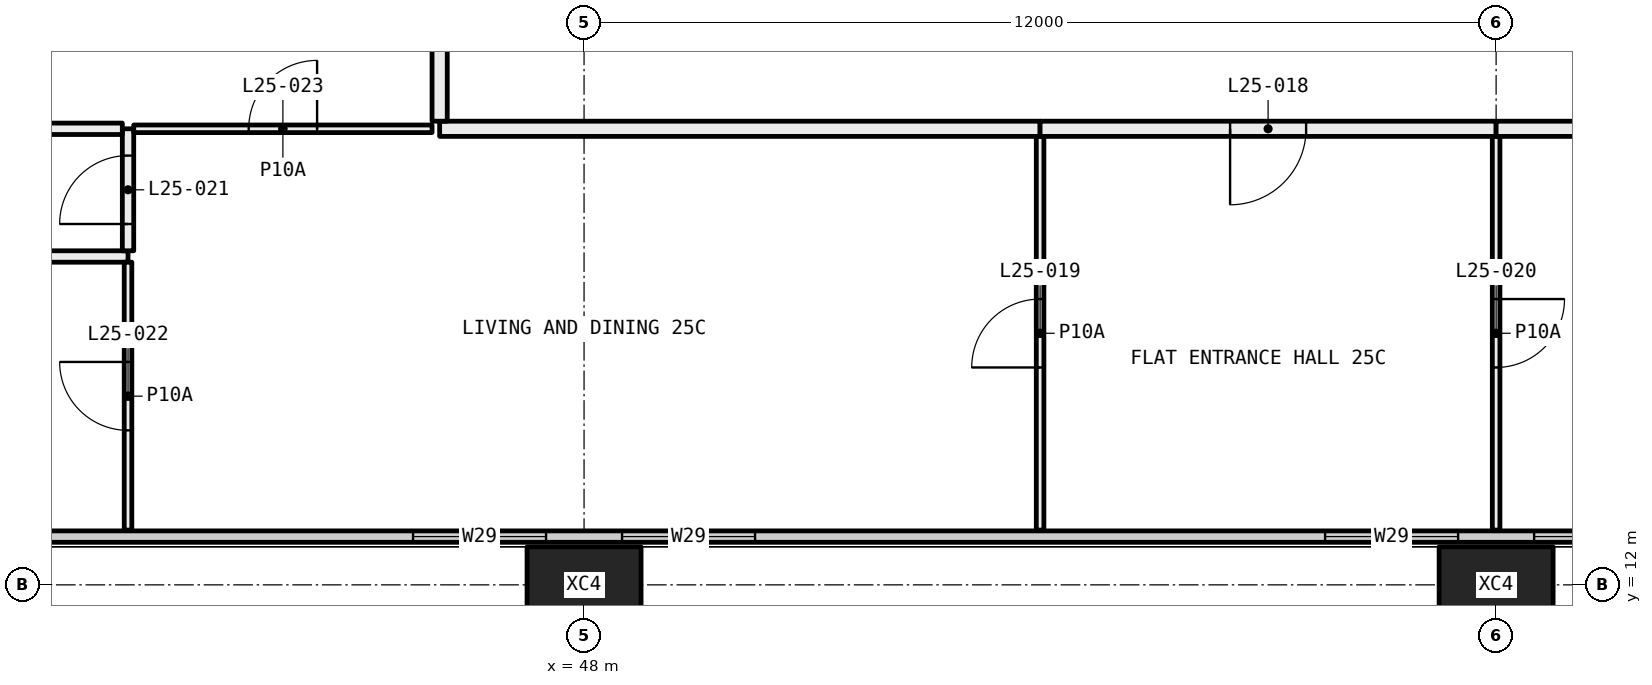
"""IFC4 building model, lengths in metres.
Left out: names, types, materials, properties, quantities, classifications, styles, units other than length and angle.
Written with IfcOpenShell. Run it as: python <this file> out.ifc"""

import sys

from ifc_helpers import new_model, si_unit, direction, frame, frame_2d, origin, origin_2d, place, context, subcontext, project, spatial, rectangle, hollow_rectangle, extrude, element, fill, save


model = new_model("IFC4")
c1 = context("Model", 3, precision=1e-05, world=origin(), true_north=direction((0.0, 1.0)))
c2 = subcontext(c1, "Body", "Model", "MODEL_VIEW")
j1 = project(units=[si_unit("LENGTHUNIT", "METRE"), si_unit("PLANEANGLEUNIT", "RADIAN")], contexts=[c1])
p1 = place(None, origin())
s1 = spatial("IfcSite", under=j1, at=p1, CompositionType="ELEMENT")
p2 = place(p1, origin())
s2 = spatial("IfcBuilding", under=s1, at=p2, CompositionType="ELEMENT")
p3 = place(p2, frame((0.0, 0.0, 100.05)))
s3 = spatial("IfcBuildingStorey", under=s2, at=p3, CompositionType="ELEMENT", Elevation=100.05)
for number, where, z_axis, x_axis in (
    (1, (48.0, 12.0, -0.4), (0.0, 0.0, 1.0), (1.0, 0.0, 0.0)),
    (2, (60.0, 12.0, -0.4), (0.0, 0.0, 1.0), (1.0, 0.0, 0.0)),
):
    element("IfcColumn", number, at=place(p3, frame(where, z_axis=z_axis, x_axis=x_axis)), inside=s3, PredefinedType="COLUMN", context=c2, shape_type="SweptSolid", body=[
        extrude(hollow_rectangle(XDim=1.5, YDim=1.0, WallThickness=0.06, at=origin_2d()), origin(), (0.0, 0.0, 1.0), 3.45),
    ])
p4 = place(p3, frame((6.56, 12.635, 0.0), z_axis=(0.0, 0.0, 1.0), x_axis=(1.0, 0.0, 0.0)))
e3 = element("IfcWall", 3, at=p4, inside=s3, PredefinedType="ELEMENTEDWALL", context=c2, shape_type="SweptSolid", body=[
    extrude(rectangle(XDim=58.88, YDim=0.15, at=frame_2d((29.44, 0.0))), origin(), (0.0, 0.0, 1.0), 3.05),
])
p5 = place(p4, frame((0.44, 0.0, 0.45)))
e4 = element("IfcOpeningElement", 4, at=p5, cuts=e3, PredefinedType="OPENING", context=c2, shape_type="SweptSolid", body=[
    extrude(rectangle(XDim=4.5, YDim=2.55, at=frame_2d((2.25, 1.275))), frame((0.0, 0.085, 0.0), z_axis=(0.0, -1.0, 0.0), x_axis=(1.0, 0.0, 0.0)), (0.0, 0.0, 1.0), 0.17),
])
p6 = place(p4, frame((5.94, 0.0, 0.45)))
e5 = element("IfcOpeningElement", 5, at=p6, cuts=e3, PredefinedType="OPENING", context=c2, shape_type="SweptSolid", body=[
    extrude(rectangle(XDim=1.75, YDim=2.55, at=frame_2d((0.875, 1.275))), frame((0.0, 0.085, 0.0), z_axis=(0.0, -1.0, 0.0), x_axis=(1.0, 0.0, 0.0)), (0.0, 0.0, 1.0), 0.17),
])
p7 = place(p4, frame((15.19, 0.0, 0.45)))
e6 = element("IfcOpeningElement", 6, at=p7, cuts=e3, PredefinedType="OPENING", context=c2, shape_type="SweptSolid", body=[
    extrude(rectangle(XDim=1.75, YDim=2.55, at=frame_2d((0.875, 1.275))), frame((0.0, 0.085, 0.0), z_axis=(0.0, -1.0, 0.0), x_axis=(1.0, 0.0, 0.0)), (0.0, 0.0, 1.0), 0.17),
])
p8 = place(p4, frame((17.94, 0.0, 0.45)))
e7 = element("IfcOpeningElement", 7, at=p8, cuts=e3, PredefinedType="OPENING", context=c2, shape_type="SweptSolid", body=[
    extrude(rectangle(XDim=1.75, YDim=2.55, at=frame_2d((0.875, 1.275))), frame((0.0, 0.085, 0.0), z_axis=(0.0, -1.0, 0.0), x_axis=(1.0, 0.0, 0.0)), (0.0, 0.0, 1.0), 0.17),
])
p9 = place(p4, frame((27.19, 0.0, 0.45)))
e8 = element("IfcOpeningElement", 8, at=p9, cuts=e3, PredefinedType="OPENING", context=c2, shape_type="SweptSolid", body=[
    extrude(rectangle(XDim=1.75, YDim=2.55, at=frame_2d((0.875, 1.275))), frame((0.0, 0.085, 0.0), z_axis=(0.0, -1.0, 0.0), x_axis=(1.0, 0.0, 0.0)), (0.0, 0.0, 1.0), 0.17),
])
p10 = place(p4, frame((29.94, 0.0, 0.45)))
e9 = element("IfcOpeningElement", 9, at=p10, cuts=e3, PredefinedType="OPENING", context=c2, shape_type="SweptSolid", body=[
    extrude(rectangle(XDim=1.75, YDim=2.55, at=frame_2d((0.875, 1.275))), frame((0.0, 0.085, 0.0), z_axis=(0.0, -1.0, 0.0), x_axis=(1.0, 0.0, 0.0)), (0.0, 0.0, 1.0), 0.17),
])
p11 = place(p4, frame((39.19, 0.0, 0.45)))
e10 = element("IfcOpeningElement", 10, at=p11, cuts=e3, PredefinedType="OPENING", context=c2, shape_type="SweptSolid", body=[
    extrude(rectangle(XDim=1.75, YDim=2.55, at=frame_2d((0.875, 1.275))), frame((0.0, 0.085, 0.0), z_axis=(0.0, -1.0, 0.0), x_axis=(1.0, 0.0, 0.0)), (0.0, 0.0, 1.0), 0.17),
])
p12 = place(p4, frame((41.94, 0.0, 0.45)))
e11 = element("IfcOpeningElement", 11, at=p12, cuts=e3, PredefinedType="OPENING", context=c2, shape_type="SweptSolid", body=[
    extrude(rectangle(XDim=1.75, YDim=2.55, at=frame_2d((0.875, 1.275))), frame((0.0, 0.085, 0.0), z_axis=(0.0, -1.0, 0.0), x_axis=(1.0, 0.0, 0.0)), (0.0, 0.0, 1.0), 0.17),
])
p13 = place(p4, frame((51.19, 0.0, 0.45)))
e12 = element("IfcOpeningElement", 12, at=p13, cuts=e3, PredefinedType="OPENING", context=c2, shape_type="SweptSolid", body=[
    extrude(rectangle(XDim=1.75, YDim=2.55, at=frame_2d((0.875, 1.275))), frame((0.0, 0.085, 0.0), z_axis=(0.0, -1.0, 0.0), x_axis=(1.0, 0.0, 0.0)), (0.0, 0.0, 1.0), 0.17),
])
p14 = place(p4, frame((53.94, 0.0, 0.45)))
e13 = element("IfcOpeningElement", 13, at=p14, cuts=e3, PredefinedType="OPENING", context=c2, shape_type="SweptSolid", body=[
    extrude(rectangle(XDim=4.5, YDim=2.55, at=frame_2d((2.25, 1.275))), frame((0.0, 0.085, 0.0), z_axis=(0.0, -1.0, 0.0), x_axis=(1.0, 0.0, 0.0)), (0.0, 0.0, 1.0), 0.17),
])
p15 = place(p3, frame((42.0, 16.32, 0.0), z_axis=(0.0, 0.0, 1.0), x_axis=(-1.0, 0.0, 0.0)))
e14 = element("IfcWall", 14, at=p15, inside=s3, PredefinedType="PARTITIONING", context=c2, shape_type="SweptSolid", body=[
    extrude(rectangle(XDim=5.9, YDim=0.15, at=frame_2d((2.95, 0.0))), origin(), (0.0, 0.0, 1.0), 3.05),
])
p16 = place(p3, frame((42.0, 12.72, 0.0), z_axis=(0.0, 0.0, 1.0), x_axis=(0.0, 1.0, 0.0)))
e15 = element("IfcWall", 15, at=p16, inside=s3, PredefinedType="PARTITIONING", context=c2, shape_type="SweptSolid", body=[
    extrude(rectangle(XDim=3.525, YDim=0.1, at=frame_2d((1.763, 0.0))), origin(), (0.0, 0.0, 1.0), 3.05),
])
p17 = place(p16, frame((1.312, 0.0, 0.0)))
e16 = element("IfcOpeningElement", 16, at=p17, cuts=e15, PredefinedType="OPENING", context=c2, shape_type="SweptSolid", body=[
    extrude(rectangle(XDim=0.9, YDim=2.1, at=frame_2d((0.45, 1.05))), frame((0.0, 0.06, 0.0), z_axis=(0.0, -1.0, 0.0), x_axis=(1.0, 0.0, 0.0)), (0.0, 0.0, 1.0), 0.12),
])
p18 = place(p3, frame((42.0, 16.395, 0.0), z_axis=(0.0, 0.0, 1.0), x_axis=(0.0, 1.0, 0.0)))
e17 = element("IfcWall", 17, at=p18, inside=s3, PredefinedType="PARTITIONING", context=c2, shape_type="SweptSolid", body=[
    extrude(rectangle(XDim=1.605, YDim=0.15, at=frame_2d((0.802, 0.0))), origin(), (0.0, 0.0, 1.0), 3.05),
])
p19 = place(p18, frame((0.353, 0.0, 0.0)))
e18 = element("IfcOpeningElement", 18, at=p19, cuts=e17, PredefinedType="OPENING", context=c2, shape_type="SweptSolid", body=[
    extrude(rectangle(XDim=0.9, YDim=2.1, at=frame_2d((0.45, 1.05))), frame((0.0, 0.085, 0.0), z_axis=(0.0, -1.0, 0.0), x_axis=(1.0, 0.0, 0.0)), (0.0, 0.0, 1.0), 0.17),
])
p20 = place(p3, frame((41.925, 18.0, 0.0), z_axis=(0.0, 0.0, 1.0), x_axis=(-1.0, 0.0, 0.0)))
e19 = element("IfcWall", 19, at=p20, inside=s3, PredefinedType="PARTITIONING", context=c2, shape_type="SweptSolid", body=[
    extrude(rectangle(XDim=1.425, YDim=0.15, at=frame_2d((0.712, 0.0))), origin(), (0.0, 0.0, 1.0), 3.05),
])
p21 = place(p3, frame((54.0, 12.72, 0.0), z_axis=(0.0, 0.0, 1.0), x_axis=(0.0, 1.0, 0.0)))
e20 = element("IfcWall", 20, at=p21, inside=s3, PredefinedType="PARTITIONING", context=c2, shape_type="SweptSolid", body=[
    extrude(rectangle(XDim=5.18, YDim=0.1, at=frame_2d((2.59, 0.0))), origin(), (0.0, 0.0, 1.0), 3.05),
])
p22 = place(p21, frame((2.14, 0.0, 0.0)))
e21 = element("IfcOpeningElement", 21, at=p22, cuts=e20, PredefinedType="OPENING", context=c2, shape_type="SweptSolid", body=[
    extrude(rectangle(XDim=0.9, YDim=2.1, at=frame_2d((0.45, 1.05))), frame((0.0, 0.06, 0.0), z_axis=(0.0, -1.0, 0.0), x_axis=(1.0, 0.0, 0.0)), (0.0, 0.0, 1.0), 0.12),
])
p23 = place(p3, frame((46.0, 18.0, 0.0), z_axis=(0.0, 0.0, 1.0), x_axis=(-1.0, 0.0, 0.0)))
e22 = element("IfcWall", 22, at=p23, inside=s3, PredefinedType="PARTITIONING", context=c2, shape_type="SweptSolid", body=[
    extrude(rectangle(XDim=3.925, YDim=0.1, at=frame_2d((1.962, 0.0))), origin(), (0.0, 0.0, 1.0), 3.05),
])
p24 = place(p23, frame((1.512, 0.0, 0.0)))
e23 = element("IfcOpeningElement", 23, at=p24, cuts=e22, PredefinedType="OPENING", context=c2, shape_type="SweptSolid", body=[
    extrude(rectangle(XDim=0.9, YDim=2.1, at=frame_2d((0.45, 1.05))), frame((0.0, 0.06, 0.0), z_axis=(0.0, -1.0, 0.0), x_axis=(1.0, 0.0, 0.0)), (0.0, 0.0, 1.0), 0.12),
])
p25 = place(p3, frame((54.0, 18.0, 0.0), z_axis=(0.0, 0.0, 1.0), x_axis=(-1.0, 0.0, 0.0)))
e24 = element("IfcWall", 24, at=p25, inside=s3, PredefinedType="PARTITIONING", context=c2, shape_type="SweptSolid", body=[
    extrude(rectangle(XDim=7.9, YDim=0.2, at=frame_2d((3.95, 0.0))), origin(), (0.0, 0.0, 1.0), 3.05),
])
p26 = place(p3, frame((60.0, 12.72, 0.0), z_axis=(0.0, 0.0, 1.0), x_axis=(0.0, 1.0, 0.0)))
e25 = element("IfcWall", 25, at=p26, inside=s3, PredefinedType="PARTITIONING", context=c2, shape_type="SweptSolid", body=[
    extrude(rectangle(XDim=5.18, YDim=0.1, at=frame_2d((2.59, 0.0))), origin(), (0.0, 0.0, 1.0), 3.05),
])
p27 = place(p26, frame((2.14, 0.0, 0.0)))
e26 = element("IfcOpeningElement", 26, at=p27, cuts=e25, PredefinedType="OPENING", context=c2, shape_type="SweptSolid", body=[
    extrude(rectangle(XDim=0.9, YDim=2.1, at=frame_2d((0.45, 1.05))), frame((0.0, 0.06, 0.0), z_axis=(0.0, -1.0, 0.0), x_axis=(1.0, 0.0, 0.0)), (0.0, 0.0, 1.0), 0.12),
])
p28 = place(p3, frame((60.0, 18.0, 0.0), z_axis=(0.0, 0.0, 1.0), x_axis=(-1.0, 0.0, 0.0)))
e27 = element("IfcWall", 27, at=p28, inside=s3, PredefinedType="PARTITIONING", context=c2, shape_type="SweptSolid", body=[
    extrude(rectangle(XDim=6.0, YDim=0.2, at=frame_2d((3.0, 0.0))), origin(), (0.0, 0.0, 1.0), 3.05),
])
p29 = place(p28, frame((2.5, 0.0, 0.0)))
e28 = element("IfcOpeningElement", 28, at=p29, cuts=e27, PredefinedType="OPENING", context=c2, shape_type="SweptSolid", body=[
    extrude(rectangle(XDim=1.0, YDim=2.1, at=frame_2d((0.5, 1.05))), frame((0.0, 0.11, 0.0), z_axis=(0.0, -1.0, 0.0), x_axis=(1.0, 0.0, 0.0)), (0.0, 0.0, 1.0), 0.22),
])
p30 = place(p3, frame((61.9, 18.0, 0.0), z_axis=(0.0, 0.0, 1.0), x_axis=(-1.0, 0.0, 0.0)))
e29 = element("IfcWall", 29, at=p30, inside=s3, PredefinedType="PARTITIONING", context=c2, shape_type="SweptSolid", body=[
    extrude(rectangle(XDim=1.9, YDim=0.2, at=frame_2d((0.95, 0.0))), origin(), (0.0, 0.0, 1.0), 3.05),
])
p31 = place(p3, frame((46.1, 18.1, 0.0), z_axis=(0.0, 0.0, 1.0), x_axis=(0.0, 1.0, 0.0)))
e30 = element("IfcWall", 30, at=p31, inside=s3, PredefinedType="PARTITIONING", context=c2, shape_type="SweptSolid", body=[
    extrude(rectangle(XDim=6.2, YDim=0.2, at=frame_2d((3.1, 0.0))), origin(), (0.0, 0.0, 1.0), 2.45),
])
p32 = place(p11, origin())
e31 = element("IfcWindow", 31, at=p32, inside=s3, PartitioningType="SINGLE_PANEL", PredefinedType="WINDOW", context=c2, shape_type="SweptSolid", body=[
    extrude(rectangle(XDim=1.75, YDim=2.55, at=frame_2d((0.875, 1.275))), frame((0.0, 0.03, 0.0), z_axis=(0.0, -1.0, 0.0), x_axis=(1.0, 0.0, 0.0)), (0.0, 0.0, 1.0), 0.06),
])
fill(e10, e31)
p33 = place(p12, origin())
e32 = element("IfcWindow", 32, at=p33, inside=s3, PartitioningType="SINGLE_PANEL", PredefinedType="WINDOW", context=c2, shape_type="SweptSolid", body=[
    extrude(rectangle(XDim=1.75, YDim=2.55, at=frame_2d((0.875, 1.275))), frame((0.0, 0.03, 0.0), z_axis=(0.0, -1.0, 0.0), x_axis=(1.0, 0.0, 0.0)), (0.0, 0.0, 1.0), 0.06),
])
fill(e11, e32)
p34 = place(p13, origin())
e33 = element("IfcWindow", 33, at=p34, inside=s3, PartitioningType="SINGLE_PANEL", PredefinedType="WINDOW", context=c2, shape_type="SweptSolid", body=[
    extrude(rectangle(XDim=1.75, YDim=2.55, at=frame_2d((0.875, 1.275))), frame((0.0, 0.03, 0.0), z_axis=(0.0, -1.0, 0.0), x_axis=(1.0, 0.0, 0.0)), (0.0, 0.0, 1.0), 0.06),
])
fill(e12, e33)
p35 = place(p14, origin())
e34 = element("IfcWindow", 34, at=p35, inside=s3, PartitioningType="SINGLE_PANEL", PredefinedType="WINDOW", context=c2, shape_type="SweptSolid", body=[
    extrude(rectangle(XDim=4.5, YDim=2.55, at=frame_2d((2.25, 1.275))), frame((0.0, 0.03, 0.0), z_axis=(0.0, -1.0, 0.0), x_axis=(1.0, 0.0, 0.0)), (0.0, 0.0, 1.0), 0.06),
])
fill(e13, e34)
p36 = place(p29, origin())
e35 = element("IfcDoor", 35, at=p36, inside=s3, OperationType="SINGLE_SWING_LEFT", PredefinedType="DOOR", context=c2, shape_type="SweptSolid", body=[
    extrude(rectangle(XDim=1.0, YDim=2.1, at=frame_2d((0.5, 1.05))), frame((0.0, 0.025, 0.0), z_axis=(0.0, -1.0, 0.0), x_axis=(1.0, 0.0, 0.0)), (0.0, 0.0, 1.0), 0.05),
])
fill(e28, e35)
p37 = place(p22, origin())
e36 = element("IfcDoor", 36, at=p37, inside=s3, OperationType="SINGLE_SWING_RIGHT", PredefinedType="DOOR", context=c2, shape_type="SweptSolid", body=[
    extrude(rectangle(XDim=0.9, YDim=2.1, at=frame_2d((0.45, 1.05))), frame((0.0, 0.025, 0.0), z_axis=(0.0, -1.0, 0.0), x_axis=(1.0, 0.0, 0.0)), (0.0, 0.0, 1.0), 0.05),
])
fill(e21, e36)
p38 = place(p27, frame((0.9, 0.0, 0.0), x_axis=(-1.0, 0.0, 0.0)))
e37 = element("IfcDoor", 37, at=p38, inside=s3, OperationType="SINGLE_SWING_RIGHT", PredefinedType="DOOR", context=c2, shape_type="SweptSolid", body=[
    extrude(rectangle(XDim=0.9, YDim=2.1, at=frame_2d((0.45, 1.05))), frame((0.0, 0.025, 0.0), z_axis=(0.0, -1.0, 0.0), x_axis=(1.0, 0.0, 0.0)), (0.0, 0.0, 1.0), 0.05),
])
fill(e26, e37)
p39 = place(p19, origin())
e38 = element("IfcDoor", 38, at=p39, inside=s3, OperationType="SINGLE_SWING_RIGHT", PredefinedType="DOOR", context=c2, shape_type="SweptSolid", body=[
    extrude(rectangle(XDim=0.9, YDim=2.1, at=frame_2d((0.45, 1.05))), frame((0.0, 0.025, 0.0), z_axis=(0.0, -1.0, 0.0), x_axis=(1.0, 0.0, 0.0)), (0.0, 0.0, 1.0), 0.05),
])
fill(e18, e38)
p40 = place(p17, origin())
e39 = element("IfcDoor", 39, at=p40, inside=s3, OperationType="SINGLE_SWING_LEFT", PredefinedType="DOOR", context=c2, shape_type="SweptSolid", body=[
    extrude(rectangle(XDim=0.9, YDim=2.1, at=frame_2d((0.45, 1.05))), frame((0.0, 0.025, 0.0), z_axis=(0.0, -1.0, 0.0), x_axis=(1.0, 0.0, 0.0)), (0.0, 0.0, 1.0), 0.05),
])
fill(e16, e39)
p41 = place(p24, frame((0.9, 0.0, 0.0), x_axis=(-1.0, 0.0, 0.0)))
e40 = element("IfcDoor", 40, at=p41, inside=s3, OperationType="SINGLE_SWING_LEFT", PredefinedType="DOOR", context=c2, shape_type="SweptSolid", body=[
    extrude(rectangle(XDim=0.9, YDim=2.1, at=frame_2d((0.45, 1.05))), frame((0.0, 0.025, 0.0), z_axis=(0.0, -1.0, 0.0), x_axis=(1.0, 0.0, 0.0)), (0.0, 0.0, 1.0), 0.05),
])
fill(e23, e40)
save(model, sys.argv[1])
